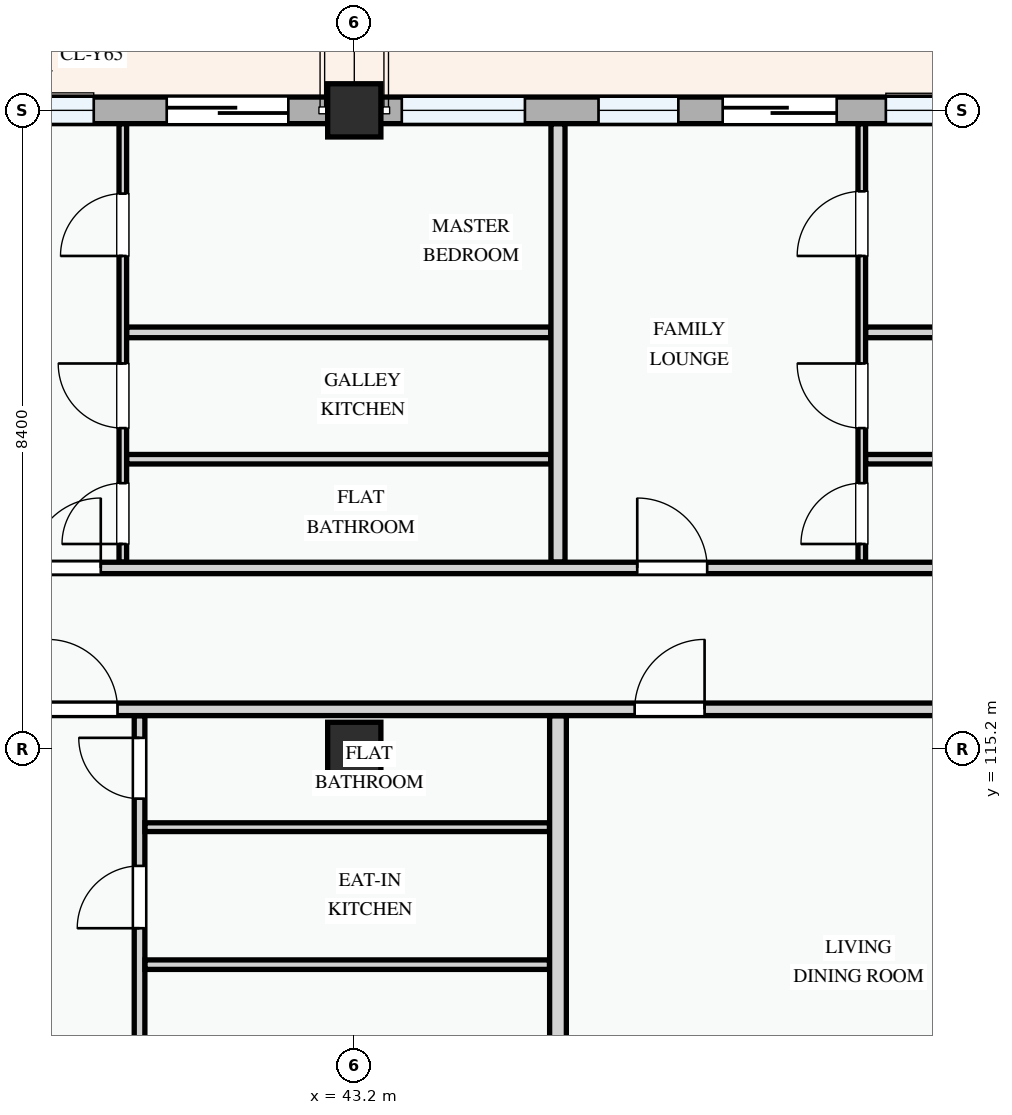
"""IFC4 building model, lengths in metres.
Left out: names, types, materials, properties, quantities, classifications, styles, units other than length and angle.
Written with IfcOpenShell. Run it as: python <this file> out.ifc"""

import sys

from ifc_helpers import new_model, si_unit, direction, frame, frame_2d, origin, origin_2d, place, context, subcontext, project, spatial, rectangle, extrude, element, fill, save


model = new_model("IFC4")
c1 = context("Model", 3, precision=1e-05, world=origin(), true_north=direction((0.0, 1.0)))
c2 = subcontext(c1, "Body", "Model", "MODEL_VIEW")
j1 = project(units=[si_unit("LENGTHUNIT", "METRE"), si_unit("PLANEANGLEUNIT", "RADIAN")], contexts=[c1])
p1 = place(None, origin())
s1 = spatial("IfcSite", under=j1, at=p1, CompositionType="ELEMENT")
p2 = place(p1, origin())
s2 = spatial("IfcBuilding", under=s1, at=p2, CompositionType="ELEMENT")
p3 = place(p2, frame((0.0, 0.0, 14.7)))
s3 = spatial("IfcBuildingStorey", under=s2, at=p3, CompositionType="ELEMENT", Elevation=14.7)
for number, where, z_axis, x_axis in (
    (1, (43.2, 115.2, 0.0), (0.0, 0.0, 1.0), (1.0, 0.0, 0.0)),
    (2, (43.2, 123.6, 0.0), (0.0, 0.0, 1.0), (1.0, 0.0, 0.0)),
):
    element("IfcColumn", number, at=place(p3, frame(where, z_axis=z_axis, x_axis=x_axis)), inside=s3, PredefinedType="COLUMN", context=c2, shape_type="SweptSolid", body=[
        extrude(rectangle(XDim=0.7, YDim=0.7, at=origin_2d()), origin(), (0.0, 0.0, 1.0), 3.3),
    ])
p4 = place(p3, frame((51.6, 123.6, 0.0), z_axis=(0.0, 0.0, 1.0), x_axis=(-1.0, 0.0, 0.0)))
e3 = element("IfcWall", 3, at=p4, inside=s3, PredefinedType="STANDARD", context=c2, shape_type="SweptSolid", body=[
    extrude(rectangle(XDim=8.4, YDim=0.35, at=frame_2d((4.2, 0.0))), origin(), (0.0, 0.0, 1.0), 2.345),
])
p5 = place(p4, frame((2.053, 0.0, 0.0)))
e4 = element("IfcOpeningElement", 4, at=p5, cuts=e3, PredefinedType="OPENING", context=c2, shape_type="SweptSolid", body=[
    extrude(rectangle(XDim=1.5, YDim=2.2, at=frame_2d((0.75, 1.1))), frame((0.0, 0.185, 0.0), z_axis=(0.0, -1.0, 0.0), x_axis=(1.0, 0.0, 0.0)), (0.0, 0.0, 1.0), 0.37),
])
p6 = place(p4, frame((0.507, 0.0, 0.78)))
e5 = element("IfcOpeningElement", 5, at=p6, cuts=e3, PredefinedType="OPENING", context=c2, shape_type="SweptSolid", body=[
    extrude(rectangle(XDim=0.9, YDim=1.2, at=frame_2d((0.45, 0.6))), frame((0.0, 0.185, 0.0), z_axis=(0.0, -1.0, 0.0), x_axis=(1.0, 0.0, 0.0)), (0.0, 0.0, 1.0), 0.37),
])
p7 = place(p4, frame((4.137, 0.0, 0.78)))
e6 = element("IfcOpeningElement", 6, at=p7, cuts=e3, PredefinedType="OPENING", context=c2, shape_type="SweptSolid", body=[
    extrude(rectangle(XDim=1.05, YDim=1.2, at=frame_2d((0.525, 0.6))), frame((0.0, 0.185, 0.0), z_axis=(0.0, -1.0, 0.0), x_axis=(1.0, 0.0, 0.0)), (0.0, 0.0, 1.0), 0.37),
])
p8 = place(p4, frame((6.155, 0.0, 0.78)))
e7 = element("IfcOpeningElement", 7, at=p8, cuts=e3, PredefinedType="OPENING", context=c2, shape_type="SweptSolid", body=[
    extrude(rectangle(XDim=1.62, YDim=1.38, at=frame_2d((0.81, 0.69))), frame((0.0, 0.185, 0.0), z_axis=(0.0, -1.0, 0.0), x_axis=(1.0, 0.0, 0.0)), (0.0, 0.0, 1.0), 0.37),
])
p9 = place(p3, frame((43.2, 123.6, 0.0), z_axis=(0.0, 0.0, 1.0), x_axis=(-1.0, 0.0, 0.0)))
e8 = element("IfcWall", 8, at=p9, inside=s3, PredefinedType="STANDARD", context=c2, shape_type="SweptSolid", body=[
    extrude(rectangle(XDim=6.0, YDim=0.35, at=frame_2d((3.0, 0.0))), origin(), (0.0, 0.0, 1.0), 2.445),
])
p10 = place(p9, frame((0.868, 0.0, 0.0)))
e9 = element("IfcOpeningElement", 9, at=p10, cuts=e8, PredefinedType="OPENING", context=c2, shape_type="SweptSolid", body=[
    extrude(rectangle(XDim=1.6, YDim=2.2, at=frame_2d((0.8, 1.1))), frame((0.0, 0.185, 0.0), z_axis=(0.0, -1.0, 0.0), x_axis=(1.0, 0.0, 0.0)), (0.0, 0.0, 1.0), 0.37),
])
p11 = place(p9, frame((3.427, 0.0, 0.78)))
e10 = element("IfcOpeningElement", 10, at=p11, cuts=e8, PredefinedType="OPENING", context=c2, shape_type="SweptSolid", body=[
    extrude(rectangle(XDim=2.0, YDim=1.5, at=frame_2d((1.0, 0.75))), frame((0.0, 0.185, 0.0), z_axis=(0.0, -1.0, 0.0), x_axis=(1.0, 0.0, 0.0)), (0.0, 0.0, 1.0), 0.37),
])
p12 = place(p3, frame((40.375, 109.377, 0.0), z_axis=(0.0, 0.0, 1.0), x_axis=(0.0, 1.0, 0.0)))
e11 = element("IfcWall", 11, at=p12, inside=s3, PredefinedType="PARTITIONING", context=c2, shape_type="SweptSolid", body=[
    extrude(rectangle(XDim=6.259, YDim=0.14, at=frame_2d((3.129, 0.0))), origin(), (0.0, 0.0, 1.0), 3.0),
])
p13 = place(p12, frame((1.008, 0.0, 0.0)))
e12 = element("IfcOpeningElement", 12, at=p13, cuts=e11, PredefinedType="OPENING", context=c2, shape_type="SweptSolid", body=[
    extrude(rectangle(XDim=0.85, YDim=2.1, at=frame_2d((0.425, 1.05))), frame((0.0, 0.08, 0.0), z_axis=(0.0, -1.0, 0.0), x_axis=(1.0, 0.0, 0.0)), (0.0, 0.0, 1.0), 0.16),
])
p14 = place(p12, frame((3.463, 0.0, 0.0)))
e13 = element("IfcOpeningElement", 13, at=p14, cuts=e11, PredefinedType="OPENING", context=c2, shape_type="SweptSolid", body=[
    extrude(rectangle(XDim=0.82, YDim=2.08, at=frame_2d((0.41, 1.04))), frame((0.0, 0.08, 0.0), z_axis=(0.0, -1.0, 0.0), x_axis=(1.0, 0.0, 0.0)), (0.0, 0.0, 1.0), 0.16),
])
p15 = place(p12, frame((5.168, 0.0, 0.0)))
e14 = element("IfcOpeningElement", 14, at=p15, cuts=e11, PredefinedType="OPENING", context=c2, shape_type="SweptSolid", body=[
    extrude(rectangle(XDim=0.8, YDim=2.1, at=frame_2d((0.4, 1.05))), frame((0.0, 0.08, 0.0), z_axis=(0.0, -1.0, 0.0), x_axis=(1.0, 0.0, 0.0)), (0.0, 0.0, 1.0), 0.16),
])
p16 = place(p3, frame((40.447, 112.361, 0.0), z_axis=(0.0, 0.0, 1.0), x_axis=(1.0, 0.0, 0.0)))
e15 = element("IfcWall", 15, at=p16, inside=s3, PredefinedType="PARTITIONING", context=c2, shape_type="SweptSolid", body=[
    extrude(rectangle(XDim=5.321, YDim=0.125, at=frame_2d((2.661, 0.0))), origin(), (0.0, 0.0, 1.0), 3.0),
])
p17 = place(p3, frame((40.447, 114.17, 0.0), z_axis=(0.0, 0.0, 1.0), x_axis=(1.0, 0.0, 0.0)))
e16 = element("IfcWall", 16, at=p17, inside=s3, PredefinedType="PARTITIONING", context=c2, shape_type="SweptSolid", body=[
    extrude(rectangle(XDim=5.321, YDim=0.115, at=frame_2d((2.661, 0.0))), origin(), (0.0, 0.0, 1.0), 3.0),
])
p18 = place(p3, frame((40.155, 117.657, 0.0), z_axis=(0.0, 0.0, 1.0), x_axis=(0.0, 1.0, 0.0)))
e17 = element("IfcWall", 17, at=p18, inside=s3, PredefinedType="PARTITIONING", context=c2, shape_type="SweptSolid", body=[
    extrude(rectangle(XDim=5.766, YDim=0.1, at=frame_2d((2.883, 0.0))), origin(), (0.0, 0.0, 1.0), 3.0),
])
p19 = place(p18, frame((0.238, 0.0, 0.0)))
e18 = element("IfcOpeningElement", 18, at=p19, cuts=e17, PredefinedType="OPENING", context=c2, shape_type="SweptSolid", body=[
    extrude(rectangle(XDim=0.8, YDim=2.1, at=frame_2d((0.4, 1.05))), frame((0.0, 0.06, 0.0), z_axis=(0.0, -1.0, 0.0), x_axis=(1.0, 0.0, 0.0)), (0.0, 0.0, 1.0), 0.12),
])
p20 = place(p18, frame((1.763, 0.0, 0.0)))
e19 = element("IfcOpeningElement", 19, at=p20, cuts=e17, PredefinedType="OPENING", context=c2, shape_type="SweptSolid", body=[
    extrude(rectangle(XDim=0.85, YDim=2.1, at=frame_2d((0.425, 1.05))), frame((0.0, 0.06, 0.0), z_axis=(0.0, -1.0, 0.0), x_axis=(1.0, 0.0, 0.0)), (0.0, 0.0, 1.0), 0.12),
])
p21 = place(p18, frame((4.028, 0.0, 0.0)))
e20 = element("IfcOpeningElement", 20, at=p21, cuts=e17, PredefinedType="OPENING", context=c2, shape_type="SweptSolid", body=[
    extrude(rectangle(XDim=0.82, YDim=2.08, at=frame_2d((0.41, 1.04))), frame((0.0, 0.06, 0.0), z_axis=(0.0, -1.0, 0.0), x_axis=(1.0, 0.0, 0.0)), (0.0, 0.0, 1.0), 0.12),
])
p22 = place(p3, frame((40.207, 120.679, 0.0), z_axis=(0.0, 0.0, 1.0), x_axis=(1.0, 0.0, 0.0)))
e21 = element("IfcWall", 21, at=p22, inside=s3, PredefinedType="PARTITIONING", context=c2, shape_type="SweptSolid", body=[
    extrude(rectangle(XDim=5.579, YDim=0.14, at=frame_2d((2.789, 0.0))), origin(), (0.0, 0.0, 1.0), 3.0),
])
p23 = place(p3, frame((40.207, 119.01, 0.0), z_axis=(0.0, 0.0, 1.0), x_axis=(1.0, 0.0, 0.0)))
e22 = element("IfcWall", 22, at=p23, inside=s3, PredefinedType="PARTITIONING", context=c2, shape_type="SweptSolid", body=[
    extrude(rectangle(XDim=5.579, YDim=0.125, at=frame_2d((2.789, 0.0))), origin(), (0.0, 0.0, 1.0), 3.0),
])
p24 = place(p3, frame((49.877, 117.657, 0.0), z_axis=(0.0, 0.0, 1.0), x_axis=(0.0, 1.0, 0.0)))
e23 = element("IfcWall", 23, at=p24, inside=s3, PredefinedType="PARTITIONING", context=c2, shape_type="SweptSolid", body=[
    extrude(rectangle(XDim=5.766, YDim=0.1, at=frame_2d((2.883, 0.0))), origin(), (0.0, 0.0, 1.0), 3.0),
])
p25 = place(p24, frame((0.238, 0.0, 0.0)))
e24 = element("IfcOpeningElement", 24, at=p25, cuts=e23, PredefinedType="OPENING", context=c2, shape_type="SweptSolid", body=[
    extrude(rectangle(XDim=0.8, YDim=2.1, at=frame_2d((0.4, 1.05))), frame((0.0, 0.06, 0.0), z_axis=(0.0, -1.0, 0.0), x_axis=(1.0, 0.0, 0.0)), (0.0, 0.0, 1.0), 0.12),
])
p26 = place(p24, frame((1.763, 0.0, 0.0)))
e25 = element("IfcOpeningElement", 25, at=p26, cuts=e23, PredefinedType="OPENING", context=c2, shape_type="SweptSolid", body=[
    extrude(rectangle(XDim=0.85, YDim=2.1, at=frame_2d((0.425, 1.05))), frame((0.0, 0.06, 0.0), z_axis=(0.0, -1.0, 0.0), x_axis=(1.0, 0.0, 0.0)), (0.0, 0.0, 1.0), 0.12),
])
p27 = place(p24, frame((4.028, 0.0, 0.0)))
e26 = element("IfcOpeningElement", 26, at=p27, cuts=e23, PredefinedType="OPENING", context=c2, shape_type="SweptSolid", body=[
    extrude(rectangle(XDim=0.85, YDim=2.1, at=frame_2d((0.425, 1.05))), frame((0.0, 0.06, 0.0), z_axis=(0.0, -1.0, 0.0), x_axis=(1.0, 0.0, 0.0)), (0.0, 0.0, 1.0), 0.12),
])
p28 = place(p3, frame((49.929, 120.679, 0.0), z_axis=(0.0, 0.0, 1.0), x_axis=(1.0, 0.0, 0.0)))
e27 = element("IfcWall", 27, at=p28, inside=s3, PredefinedType="PARTITIONING", context=c2, shape_type="SweptSolid", body=[
    extrude(rectangle(XDim=7.494, YDim=0.14, at=frame_2d((3.747, 0.0))), origin(), (0.0, 0.0, 1.0), 3.0),
])
p29 = place(p3, frame((49.929, 119.01, 0.0), z_axis=(0.0, 0.0, 1.0), x_axis=(1.0, 0.0, 0.0)))
e28 = element("IfcWall", 28, at=p29, inside=s3, PredefinedType="PARTITIONING", context=c2, shape_type="SweptSolid", body=[
    extrude(rectangle(XDim=7.494, YDim=0.125, at=frame_2d((3.747, 0.0))), origin(), (0.0, 0.0, 1.0), 3.0),
])
p30 = place(p3, frame((45.88, 109.377, 0.0), z_axis=(0.0, 0.0, 1.0), x_axis=(0.0, 1.0, 0.0)))
e29 = element("IfcWall", 29, at=p30, inside=s3, PredefinedType="PARTITIONING", context=c2, shape_type="SweptSolid", body=[
    extrude(rectangle(XDim=6.259, YDim=0.22, at=frame_2d((3.129, 0.0))), origin(), (0.0, 0.0, 1.0), 3.0),
])
p31 = place(p3, frame((45.88, 117.657, 0.0), z_axis=(0.0, 0.0, 1.0), x_axis=(0.0, 1.0, 0.0)))
e30 = element("IfcWall", 30, at=p31, inside=s3, PredefinedType="PARTITIONING", context=c2, shape_type="SweptSolid", body=[
    extrude(rectangle(XDim=5.766, YDim=0.185, at=frame_2d((2.883, 0.0))), origin(), (0.0, 0.0, 1.0), 3.0),
])
p32 = place(p3, frame((25.15, 115.72, 0.0), z_axis=(0.0, 0.0, 1.0), x_axis=(1.0, 0.0, 0.0)))
e31 = element("IfcWall", 31, at=p32, inside=s3, PredefinedType="PARTITIONING", context=c2, shape_type="SweptSolid", body=[
    extrude(rectangle(XDim=32.273, YDim=0.165, at=frame_2d((16.137, 0.0))), origin(), (0.0, 0.0, 1.0), 3.0),
])
p33 = place(p32, frame((0.25, 0.0, 0.0)))
e32 = element("IfcOpeningElement", 32, at=p33, cuts=e31, PredefinedType="OPENING", context=c2, shape_type="SweptSolid", body=[
    extrude(rectangle(XDim=0.92, YDim=2.1, at=frame_2d((0.46, 1.05))), frame((0.0, 0.093, 0.0), z_axis=(0.0, -1.0, 0.0), x_axis=(1.0, 0.0, 0.0)), (0.0, 0.0, 1.0), 0.185),
])
p34 = place(p32, frame((14.015, 0.0, 0.0)))
e33 = element("IfcOpeningElement", 33, at=p34, cuts=e31, PredefinedType="OPENING", context=c2, shape_type="SweptSolid", body=[
    extrude(rectangle(XDim=0.92, YDim=2.1, at=frame_2d((0.46, 1.05))), frame((0.0, 0.093, 0.0), z_axis=(0.0, -1.0, 0.0), x_axis=(1.0, 0.0, 0.0)), (0.0, 0.0, 1.0), 0.185),
])
p35 = place(p32, frame((21.739, 0.0, 0.0)))
e34 = element("IfcOpeningElement", 34, at=p35, cuts=e31, PredefinedType="OPENING", context=c2, shape_type="SweptSolid", body=[
    extrude(rectangle(XDim=0.92, YDim=2.1, at=frame_2d((0.46, 1.05))), frame((0.0, 0.093, 0.0), z_axis=(0.0, -1.0, 0.0), x_axis=(1.0, 0.0, 0.0)), (0.0, 0.0, 1.0), 0.185),
])
p36 = place(p3, frame((22.66, 117.58, 0.0), z_axis=(0.0, 0.0, 1.0), x_axis=(1.0, 0.0, 0.0)))
e35 = element("IfcWall", 35, at=p36, inside=s3, PredefinedType="PARTITIONING", context=c2, shape_type="SweptSolid", body=[
    extrude(rectangle(XDim=34.763, YDim=0.15, at=frame_2d((17.382, 0.0))), origin(), (0.0, 0.0, 1.0), 3.0),
])
p37 = place(p36, frame((2.74, 0.0, 0.0)))
e36 = element("IfcOpeningElement", 36, at=p37, cuts=e35, PredefinedType="OPENING", context=c2, shape_type="SweptSolid", body=[
    extrude(rectangle(XDim=0.96, YDim=2.12, at=frame_2d((0.48, 1.06))), frame((0.0, 0.085, 0.0), z_axis=(0.0, -1.0, 0.0), x_axis=(1.0, 0.0, 0.0)), (0.0, 0.0, 1.0), 0.17),
])
p38 = place(p36, frame((16.285, 0.0, 0.0)))
e37 = element("IfcOpeningElement", 37, at=p38, cuts=e35, PredefinedType="OPENING", context=c2, shape_type="SweptSolid", body=[
    extrude(rectangle(XDim=0.92, YDim=2.1, at=frame_2d((0.46, 1.05))), frame((0.0, 0.085, 0.0), z_axis=(0.0, -1.0, 0.0), x_axis=(1.0, 0.0, 0.0)), (0.0, 0.0, 1.0), 0.17),
])
p39 = place(p36, frame((24.263, 0.0, 0.0)))
e38 = element("IfcOpeningElement", 38, at=p39, cuts=e35, PredefinedType="OPENING", context=c2, shape_type="SweptSolid", body=[
    extrude(rectangle(XDim=0.92, YDim=2.1, at=frame_2d((0.46, 1.05))), frame((0.0, 0.085, 0.0), z_axis=(0.0, -1.0, 0.0), x_axis=(1.0, 0.0, 0.0)), (0.0, 0.0, 1.0), 0.17),
])
p40 = place(p5, frame((1.5, 0.0, 0.0), z_axis=(0.0, 0.0, 1.0), x_axis=(-1.0, 0.0, 0.0)))
e39 = element("IfcDoor", 39, at=p40, inside=s3, OperationType="SLIDING_TO_RIGHT", PredefinedType="DOOR", context=c2, shape_type="SweptSolid", body=[
    extrude(rectangle(XDim=1.5, YDim=2.2, at=frame_2d((0.75, 1.1))), frame((0.0, 0.025, 0.0), z_axis=(0.0, -1.0, 0.0), x_axis=(1.0, 0.0, 0.0)), (0.0, 0.0, 1.0), 0.05),
])
fill(e4, e39)
p41 = place(p6, origin())
e40 = element("IfcWindow", 40, at=p41, inside=s3, PartitioningType="SINGLE_PANEL", PredefinedType="WINDOW", context=c2, shape_type="SweptSolid", body=[
    extrude(rectangle(XDim=0.9, YDim=1.2, at=frame_2d((0.45, 0.6))), frame((0.0, 0.03, 0.0), z_axis=(0.0, -1.0, 0.0), x_axis=(1.0, 0.0, 0.0)), (0.0, 0.0, 1.0), 0.06),
])
fill(e5, e40)
p42 = place(p7, origin())
e41 = element("IfcWindow", 41, at=p42, inside=s3, PartitioningType="SINGLE_PANEL", PredefinedType="WINDOW", context=c2, shape_type="SweptSolid", body=[
    extrude(rectangle(XDim=1.05, YDim=1.2, at=frame_2d((0.525, 0.6))), frame((0.0, 0.03, 0.0), z_axis=(0.0, -1.0, 0.0), x_axis=(1.0, 0.0, 0.0)), (0.0, 0.0, 1.0), 0.06),
])
fill(e6, e41)
p43 = place(p8, origin())
e42 = element("IfcWindow", 42, at=p43, inside=s3, PartitioningType="DOUBLE_PANEL_VERTICAL", PredefinedType="WINDOW", context=c2, shape_type="SweptSolid", body=[
    extrude(rectangle(XDim=1.62, YDim=1.38, at=frame_2d((0.81, 0.69))), frame((0.0, 0.03, 0.0), z_axis=(0.0, -1.0, 0.0), x_axis=(1.0, 0.0, 0.0)), (0.0, 0.0, 1.0), 0.06),
])
fill(e7, e42)
p44 = place(p10, frame((1.6, 0.0, 0.0), z_axis=(0.0, 0.0, 1.0), x_axis=(-1.0, 0.0, 0.0)))
e43 = element("IfcDoor", 43, at=p44, inside=s3, OperationType="SLIDING_TO_LEFT", PredefinedType="DOOR", context=c2, shape_type="SweptSolid", body=[
    extrude(rectangle(XDim=1.6, YDim=2.2, at=frame_2d((0.8, 1.1))), frame((0.0, 0.025, 0.0), z_axis=(0.0, -1.0, 0.0), x_axis=(1.0, 0.0, 0.0)), (0.0, 0.0, 1.0), 0.05),
])
fill(e9, e43)
p45 = place(p11, origin())
e44 = element("IfcWindow", 44, at=p45, inside=s3, PartitioningType="DOUBLE_PANEL_VERTICAL", PredefinedType="WINDOW", context=c2, shape_type="SweptSolid", body=[
    extrude(rectangle(XDim=2.0, YDim=1.5, at=frame_2d((1.0, 0.75))), frame((0.0, 0.03, 0.0), z_axis=(0.0, -1.0, 0.0), x_axis=(1.0, 0.0, 0.0)), (0.0, 0.0, 1.0), 0.06),
])
fill(e10, e44)
p46 = place(p14, origin())
e45 = element("IfcDoor", 45, at=p46, inside=s3, OperationType="SINGLE_SWING_LEFT", PredefinedType="DOOR", context=c2, shape_type="SweptSolid", body=[
    extrude(rectangle(XDim=0.82, YDim=2.08, at=frame_2d((0.41, 1.04))), frame((0.0, 0.025, 0.0), z_axis=(0.0, -1.0, 0.0), x_axis=(1.0, 0.0, 0.0)), (0.0, 0.0, 1.0), 0.05),
])
fill(e13, e45)
p47 = place(p15, origin())
e46 = element("IfcDoor", 46, at=p47, inside=s3, OperationType="SINGLE_SWING_RIGHT", PredefinedType="DOOR", context=c2, shape_type="SweptSolid", body=[
    extrude(rectangle(XDim=0.8, YDim=2.1, at=frame_2d((0.4, 1.05))), frame((0.0, 0.025, 0.0), z_axis=(0.0, -1.0, 0.0), x_axis=(1.0, 0.0, 0.0)), (0.0, 0.0, 1.0), 0.05),
])
fill(e14, e46)
p48 = place(p19, origin())
e47 = element("IfcDoor", 47, at=p48, inside=s3, OperationType="SINGLE_SWING_LEFT", PredefinedType="DOOR", context=c2, shape_type="SweptSolid", body=[
    extrude(rectangle(XDim=0.8, YDim=2.1, at=frame_2d((0.4, 1.05))), frame((0.0, 0.025, 0.0), z_axis=(0.0, -1.0, 0.0), x_axis=(1.0, 0.0, 0.0)), (0.0, 0.0, 1.0), 0.05),
])
fill(e18, e47)
p49 = place(p20, origin())
e48 = element("IfcDoor", 48, at=p49, inside=s3, OperationType="SINGLE_SWING_RIGHT", PredefinedType="DOOR", context=c2, shape_type="SweptSolid", body=[
    extrude(rectangle(XDim=0.85, YDim=2.1, at=frame_2d((0.425, 1.05))), frame((0.0, 0.025, 0.0), z_axis=(0.0, -1.0, 0.0), x_axis=(1.0, 0.0, 0.0)), (0.0, 0.0, 1.0), 0.05),
])
fill(e19, e48)
p50 = place(p21, origin())
e49 = element("IfcDoor", 49, at=p50, inside=s3, OperationType="SINGLE_SWING_LEFT", PredefinedType="DOOR", context=c2, shape_type="SweptSolid", body=[
    extrude(rectangle(XDim=0.82, YDim=2.08, at=frame_2d((0.41, 1.04))), frame((0.0, 0.025, 0.0), z_axis=(0.0, -1.0, 0.0), x_axis=(1.0, 0.0, 0.0)), (0.0, 0.0, 1.0), 0.05),
])
fill(e20, e49)
p51 = place(p25, origin())
e50 = element("IfcDoor", 50, at=p51, inside=s3, OperationType="SINGLE_SWING_LEFT", PredefinedType="DOOR", context=c2, shape_type="SweptSolid", body=[
    extrude(rectangle(XDim=0.8, YDim=2.1, at=frame_2d((0.4, 1.05))), frame((0.0, 0.025, 0.0), z_axis=(0.0, -1.0, 0.0), x_axis=(1.0, 0.0, 0.0)), (0.0, 0.0, 1.0), 0.05),
])
fill(e24, e50)
p52 = place(p26, origin())
e51 = element("IfcDoor", 51, at=p52, inside=s3, OperationType="SINGLE_SWING_RIGHT", PredefinedType="DOOR", context=c2, shape_type="SweptSolid", body=[
    extrude(rectangle(XDim=0.85, YDim=2.1, at=frame_2d((0.425, 1.05))), frame((0.0, 0.025, 0.0), z_axis=(0.0, -1.0, 0.0), x_axis=(1.0, 0.0, 0.0)), (0.0, 0.0, 1.0), 0.05),
])
fill(e25, e51)
p53 = place(p27, origin())
e52 = element("IfcDoor", 52, at=p53, inside=s3, OperationType="SINGLE_SWING_LEFT", PredefinedType="DOOR", context=c2, shape_type="SweptSolid", body=[
    extrude(rectangle(XDim=0.85, YDim=2.1, at=frame_2d((0.425, 1.05))), frame((0.0, 0.025, 0.0), z_axis=(0.0, -1.0, 0.0), x_axis=(1.0, 0.0, 0.0)), (0.0, 0.0, 1.0), 0.05),
])
fill(e26, e52)
p54 = place(p34, origin())
e53 = element("IfcDoor", 53, at=p54, inside=s3, OperationType="SINGLE_SWING_LEFT", PredefinedType="DOOR", context=c2, shape_type="SweptSolid", body=[
    extrude(rectangle(XDim=0.92, YDim=2.1, at=frame_2d((0.46, 1.05))), frame((0.0, 0.025, 0.0), z_axis=(0.0, -1.0, 0.0), x_axis=(1.0, 0.0, 0.0)), (0.0, 0.0, 1.0), 0.05),
])
fill(e33, e53)
p55 = place(p35, origin())
e54 = element("IfcDoor", 54, at=p55, inside=s3, OperationType="SINGLE_SWING_RIGHT", PredefinedType="DOOR", context=c2, shape_type="SweptSolid", body=[
    extrude(rectangle(XDim=0.92, YDim=2.1, at=frame_2d((0.46, 1.05))), frame((0.0, 0.025, 0.0), z_axis=(0.0, -1.0, 0.0), x_axis=(1.0, 0.0, 0.0)), (0.0, 0.0, 1.0), 0.05),
])
fill(e34, e54)
p56 = place(p38, origin())
e55 = element("IfcDoor", 55, at=p56, inside=s3, OperationType="SINGLE_SWING_RIGHT", PredefinedType="DOOR", context=c2, shape_type="SweptSolid", body=[
    extrude(rectangle(XDim=0.92, YDim=2.1, at=frame_2d((0.46, 1.05))), frame((0.0, 0.025, 0.0), z_axis=(0.0, -1.0, 0.0), x_axis=(1.0, 0.0, 0.0)), (0.0, 0.0, 1.0), 0.05),
])
fill(e37, e55)
p57 = place(p39, origin())
e56 = element("IfcDoor", 56, at=p57, inside=s3, OperationType="SINGLE_SWING_LEFT", PredefinedType="DOOR", context=c2, shape_type="SweptSolid", body=[
    extrude(rectangle(XDim=0.92, YDim=2.1, at=frame_2d((0.46, 1.05))), frame((0.0, 0.025, 0.0), z_axis=(0.0, -1.0, 0.0), x_axis=(1.0, 0.0, 0.0)), (0.0, 0.0, 1.0), 0.05),
])
fill(e38, e56)
save(model, sys.argv[1])
